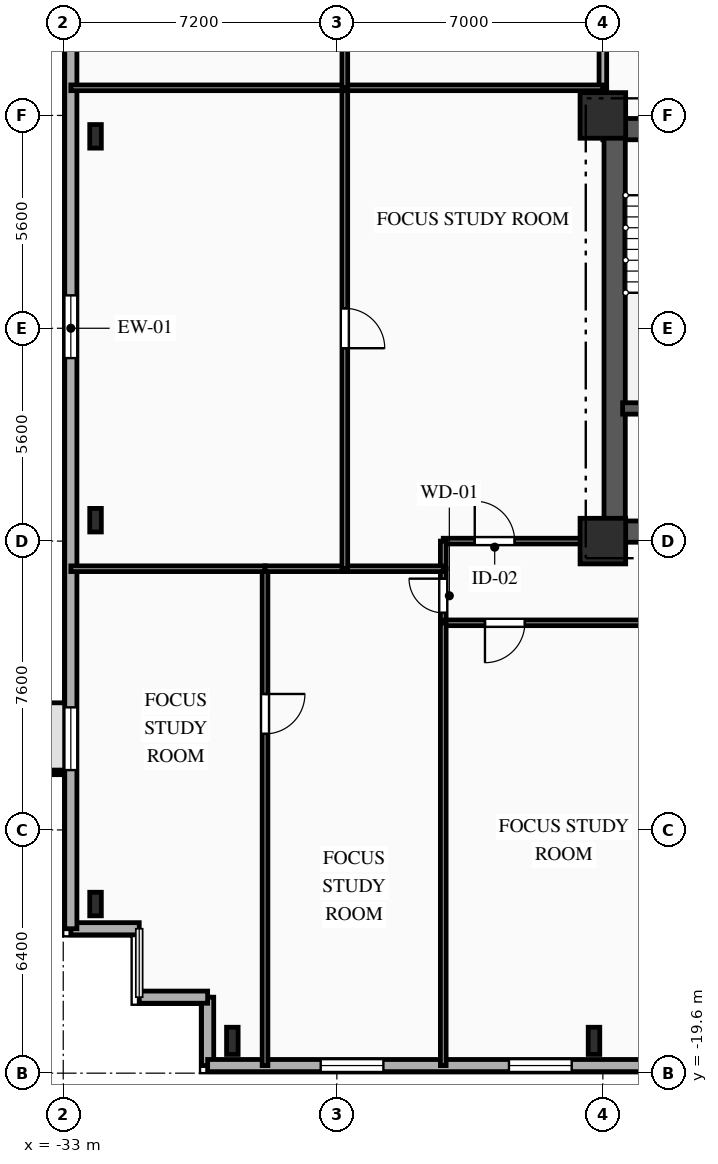
"""IFC4 building model, lengths in metres.
Left out: names, types, materials, properties, quantities, classifications, styles, units other than length and angle.
Written with IfcOpenShell. Run it as: python <this file> out.ifc"""

import sys

from ifc_helpers import new_model, si_unit, direction, frame, frame_2d, origin, origin_2d, place, context, subcontext, project, spatial, rectangle, i_section, extrude, element, fill, save


model = new_model("IFC4")
c1 = context("Model", 3, precision=1e-05, world=origin(), true_north=direction((0.0, 1.0)))
c2 = subcontext(c1, "Body", "Model", "MODEL_VIEW")
j1 = project(units=[si_unit("LENGTHUNIT", "METRE"), si_unit("PLANEANGLEUNIT", "RADIAN")], contexts=[c1])
p1 = place(None, origin())
s1 = spatial("IfcSite", under=j1, at=p1, CompositionType="ELEMENT")
p2 = place(p1, origin())
s2 = spatial("IfcBuilding", under=s1, at=p2, CompositionType="ELEMENT")
p3 = place(p2, frame((0.0, 0.0, 70.55)))
s3 = spatial("IfcBuildingStorey", under=s2, at=p3, CompositionType="ELEMENT", Elevation=70.55)
for number, where, z_axis, x_axis in (
    (1, (-18.8, -5.6, 0.0), (0.0, 0.0, 1.0), (1.0, 0.0, 0.0)),
    (2, (-18.8, 5.6, 0.0), (0.0, 0.0, 1.0), (1.0, 0.0, 0.0)),
):
    element("IfcColumn", number, at=place(p3, frame(where, z_axis=z_axis, x_axis=x_axis)), inside=s3, PredefinedType="COLUMN", context=c2, shape_type="SweptSolid", body=[
        extrude(rectangle(XDim=1.2, YDim=1.2, at=origin_2d()), origin(), (0.0, 0.0, 1.0), 3.35),
    ])
for number, where, z_axis, x_axis in (
    (3, (-28.55, -18.75, 0.0), (0.0, 0.0, 1.0), (1.0, 0.0, 0.0)),
    (4, (-19.033, -18.75, 0.0), (0.0, 0.0, 1.0), (1.0, 0.0, 0.0)),
):
    element("IfcColumn", number, at=place(p3, frame(where, z_axis=z_axis, x_axis=x_axis)), inside=s3, PredefinedType="COLUMN", context=c2, shape_type="SweptSolid", body=[
        extrude(i_section(OverallWidth=0.304, OverallDepth=0.716, WebThickness=0.021, FlangeThickness=0.04, FilletRadius=0.027, at=origin_2d()), origin(), (0.0, 0.0, 1.0), 3.35),
    ])
for number, where, z_axis, x_axis in (
    (5, (-32.15, 5.05, 0.0), (0.0, 0.0, 1.0), (1.0, 0.0, 0.0)),
    (6, (-32.15, -5.05, 0.0), (0.0, 0.0, 1.0), (1.0, 0.0, 0.0)),
    (7, (-32.15, -15.15, 0.0), (0.0, 0.0, 1.0), (1.0, 0.0, 0.0)),
):
    element("IfcColumn", number, at=place(p3, frame(where, z_axis=z_axis, x_axis=x_axis)), inside=s3, PredefinedType="COLUMN", context=c2, shape_type="SweptSolid", body=[
        extrude(i_section(OverallWidth=0.305, OverallDepth=0.62, WebThickness=0.021, FlangeThickness=0.04, FilletRadius=0.027, at=origin_2d()), origin(), (0.0, 0.0, 1.0), 3.35),
    ])
p4 = place(p3, frame((-29.2, -19.4, 0.0), z_axis=(0.0, 0.0, 1.0), x_axis=(0.0, 1.0, 0.0)))
e8 = element("IfcWall", 8, at=p4, inside=s3, PredefinedType="SOLIDWALL", context=c2, shape_type="SweptSolid", body=[
    extrude(rectangle(XDim=1.8, YDim=0.32, at=frame_2d((0.9, 0.0))), origin(), (0.0, 0.0, 1.0), 3.0),
])
for number, where, z_axis, x_axis in (
    (9, (-29.2, -17.6, 0.0), (0.0, 0.0, 1.0), (-1.0, 0.0, 0.0)),
    (10, (-31.0, -15.8, 0.0), (0.0, 0.0, 1.0), (-1.0, 0.0, 0.0)),
):
    element("IfcWall", number, at=place(p3, frame(where, z_axis=z_axis, x_axis=x_axis)), inside=s3, PredefinedType="SOLIDWALL", context=c2, shape_type="SweptSolid", body=[
        extrude(rectangle(XDim=1.8, YDim=0.32, at=frame_2d((0.9, 0.0))), origin(), (0.0, 0.0, 1.0), 3.0),
    ])
p5 = place(p3, frame((-32.8, -15.8, 0.0), z_axis=(0.0, 0.0, 1.0), x_axis=(0.0, 1.0, 0.0)))
e11 = element("IfcWall", 11, at=p5, inside=s3, PredefinedType="SOLIDWALL", context=c2, shape_type="SweptSolid", body=[
    extrude(rectangle(XDim=31.6, YDim=0.32, at=frame_2d((15.8, 0.0))), origin(), (0.0, 0.0, 1.0), 3.0),
])
p6 = place(p5, frame((4.175, 0.0, 0.85)))
e12 = element("IfcOpeningElement", 12, at=p6, cuts=e11, PredefinedType="OPENING", context=c2, shape_type="SweptSolid", body=[
    extrude(rectangle(XDim=1.65, YDim=1.85, at=frame_2d((0.825, 0.925))), frame((0.0, 0.17, 0.0), z_axis=(0.0, -1.0, 0.0), x_axis=(1.0, 0.0, 0.0)), (0.0, 0.0, 1.0), 0.34),
])
p7 = place(p5, frame((15.015, 0.0, 0.85)))
e13 = element("IfcOpeningElement", 13, at=p7, cuts=e11, PredefinedType="OPENING", context=c2, shape_type="SweptSolid", body=[
    extrude(rectangle(XDim=1.65, YDim=1.85, at=frame_2d((0.825, 0.925))), frame((0.0, 0.17, 0.0), z_axis=(0.0, -1.0, 0.0), x_axis=(1.0, 0.0, 0.0)), (0.0, 0.0, 1.0), 0.34),
])
p8 = place(p5, frame((25.855, 0.0, 0.85)))
e14 = element("IfcOpeningElement", 14, at=p8, cuts=e11, PredefinedType="OPENING", context=c2, shape_type="SweptSolid", body=[
    extrude(rectangle(XDim=1.65, YDim=1.85, at=frame_2d((0.825, 0.925))), frame((0.0, 0.17, 0.0), z_axis=(0.0, -1.0, 0.0), x_axis=(1.0, 0.0, 0.0)), (0.0, 0.0, 1.0), 0.34),
])
p9 = place(p3, frame((29.2, -19.4, 0.0), z_axis=(0.0, 0.0, 1.0), x_axis=(-1.0, 0.0, 0.0)))
e15 = element("IfcWall", 15, at=p9, inside=s3, PredefinedType="SOLIDWALL", context=c2, shape_type="SweptSolid", body=[
    extrude(rectangle(XDim=58.4, YDim=0.32, at=frame_2d((29.2, 0.0))), origin(), (0.0, 0.0, 1.0), 3.0),
])
p10 = place(p9, frame((2.535, 0.0, 0.85)))
e16 = element("IfcOpeningElement", 16, at=p10, cuts=e15, PredefinedType="OPENING", context=c2, shape_type="SweptSolid", body=[
    extrude(rectangle(XDim=1.65, YDim=1.85, at=frame_2d((0.825, 0.925))), frame((0.0, 0.17, 0.0), z_axis=(0.0, -1.0, 0.0), x_axis=(1.0, 0.0, 0.0)), (0.0, 0.0, 1.0), 0.34),
])
p11 = place(p9, frame((7.975, 0.0, 0.85)))
e17 = element("IfcOpeningElement", 17, at=p11, cuts=e15, PredefinedType="OPENING", context=c2, shape_type="SweptSolid", body=[
    extrude(rectangle(XDim=1.65, YDim=1.85, at=frame_2d((0.825, 0.925))), frame((0.0, 0.17, 0.0), z_axis=(0.0, -1.0, 0.0), x_axis=(1.0, 0.0, 0.0)), (0.0, 0.0, 1.0), 0.34),
])
p12 = place(p9, frame((13.14, 0.0, 0.85)))
e18 = element("IfcOpeningElement", 18, at=p12, cuts=e15, PredefinedType="OPENING", context=c2, shape_type="SweptSolid", body=[
    extrude(rectangle(XDim=2.2, YDim=1.85, at=frame_2d((1.1, 0.925))), frame((0.0, 0.17, 0.0), z_axis=(0.0, -1.0, 0.0), x_axis=(1.0, 0.0, 0.0)), (0.0, 0.0, 1.0), 0.34),
])
p13 = place(p9, frame((19.992, 0.0, 0.85)))
e19 = element("IfcOpeningElement", 19, at=p13, cuts=e15, PredefinedType="OPENING", context=c2, shape_type="SweptSolid", body=[
    extrude(rectangle(XDim=2.2, YDim=1.85, at=frame_2d((1.1, 0.925))), frame((0.0, 0.17, 0.0), z_axis=(0.0, -1.0, 0.0), x_axis=(1.0, 0.0, 0.0)), (0.0, 0.0, 1.0), 0.34),
])
p14 = place(p9, frame((24.66, 0.0, 0.85)))
e20 = element("IfcOpeningElement", 20, at=p14, cuts=e15, PredefinedType="OPENING", context=c2, shape_type="SweptSolid", body=[
    extrude(rectangle(XDim=2.2, YDim=1.85, at=frame_2d((1.1, 0.925))), frame((0.0, 0.17, 0.0), z_axis=(0.0, -1.0, 0.0), x_axis=(1.0, 0.0, 0.0)), (0.0, 0.0, 1.0), 0.34),
])
p15 = place(p9, frame((30.42, 0.0, 0.85)))
e21 = element("IfcOpeningElement", 21, at=p15, cuts=e15, PredefinedType="OPENING", context=c2, shape_type="SweptSolid", body=[
    extrude(rectangle(XDim=2.2, YDim=1.85, at=frame_2d((1.1, 0.925))), frame((0.0, 0.17, 0.0), z_axis=(0.0, -1.0, 0.0), x_axis=(1.0, 0.0, 0.0)), (0.0, 0.0, 1.0), 0.34),
])
p16 = place(p9, frame((36.18, 0.0, 0.85)))
e22 = element("IfcOpeningElement", 22, at=p16, cuts=e15, PredefinedType="OPENING", context=c2, shape_type="SweptSolid", body=[
    extrude(rectangle(XDim=2.2, YDim=1.85, at=frame_2d((1.1, 0.925))), frame((0.0, 0.17, 0.0), z_axis=(0.0, -1.0, 0.0), x_axis=(1.0, 0.0, 0.0)), (0.0, 0.0, 1.0), 0.34),
])
p17 = place(p9, frame((41.94, 0.0, 0.85)))
e23 = element("IfcOpeningElement", 23, at=p17, cuts=e15, PredefinedType="OPENING", context=c2, shape_type="SweptSolid", body=[
    extrude(rectangle(XDim=2.2, YDim=1.85, at=frame_2d((1.1, 0.925))), frame((0.0, 0.17, 0.0), z_axis=(0.0, -1.0, 0.0), x_axis=(1.0, 0.0, 0.0)), (0.0, 0.0, 1.0), 0.34),
])
p18 = place(p9, frame((48.821, 0.0, 0.85)))
e24 = element("IfcOpeningElement", 24, at=p18, cuts=e15, PredefinedType="OPENING", context=c2, shape_type="SweptSolid", body=[
    extrude(rectangle(XDim=1.65, YDim=1.85, at=frame_2d((0.825, 0.925))), frame((0.0, 0.17, 0.0), z_axis=(0.0, -1.0, 0.0), x_axis=(1.0, 0.0, 0.0)), (0.0, 0.0, 1.0), 0.34),
])
p19 = place(p9, frame((53.775, 0.0, 0.85)))
e25 = element("IfcOpeningElement", 25, at=p19, cuts=e15, PredefinedType="OPENING", context=c2, shape_type="SweptSolid", body=[
    extrude(rectangle(XDim=1.65, YDim=1.85, at=frame_2d((0.825, 0.925))), frame((0.0, 0.17, 0.0), z_axis=(0.0, -1.0, 0.0), x_axis=(1.0, 0.0, 0.0)), (0.0, 0.0, 1.0), 0.34),
])
p20 = place(p3, frame((-18.8, 5.24, 0.0), z_axis=(0.0, 0.0, 1.0), x_axis=(1.0, 0.0, 0.0)))
e26 = element("IfcWall", 26, at=p20, inside=s3, PredefinedType="SHEAR", context=c2, shape_type="SweptSolid", body=[
    extrude(rectangle(XDim=9.6, YDim=0.56, at=frame_2d((4.8, 0.0))), origin(), (0.0, 0.0, 1.0), 3.0),
])
p21 = place(p20, frame((1.55, 0.0, 0.0)))
e27 = element("IfcOpeningElement", 27, at=p21, cuts=e26, PredefinedType="OPENING", context=c2, shape_type="SweptSolid", body=[
    extrude(rectangle(XDim=1.1, YDim=2.15, at=frame_2d((0.55, 1.075))), frame((0.0, 0.29, 0.0), z_axis=(0.0, -1.0, 0.0), x_axis=(1.0, 0.0, 0.0)), (0.0, 0.0, 1.0), 0.58),
])
p22 = place(p20, frame((4.775, 0.0, 0.0)))
e28 = element("IfcOpeningElement", 28, at=p22, cuts=e26, PredefinedType="OPENING", context=c2, shape_type="SweptSolid", body=[
    extrude(rectangle(XDim=1.05, YDim=2.1, at=frame_2d((0.525, 1.05))), frame((0.0, 0.29, 0.0), z_axis=(0.0, -1.0, 0.0), x_axis=(1.0, 0.0, 0.0)), (0.0, 0.0, 1.0), 0.58),
])
p23 = place(p3, frame((-18.8, -5.35, 0.0), z_axis=(0.0, 0.0, 1.0), x_axis=(1.0, 0.0, 0.0)))
e29 = element("IfcWall", 29, at=p23, inside=s3, PredefinedType="SHEAR", context=c2, shape_type="SweptSolid", body=[
    extrude(rectangle(XDim=9.6, YDim=0.56, at=frame_2d((4.8, 0.0))), origin(), (0.0, 0.0, 1.0), 3.0),
])
p24 = place(p23, frame((1.05, 0.0, 0.0)))
e30 = element("IfcOpeningElement", 30, at=p24, cuts=e29, PredefinedType="OPENING", context=c2, shape_type="SweptSolid", body=[
    extrude(rectangle(XDim=0.9, YDim=2.1, at=frame_2d((0.45, 1.05))), frame((0.0, 0.29, 0.0), z_axis=(0.0, -1.0, 0.0), x_axis=(1.0, 0.0, 0.0)), (0.0, 0.0, 1.0), 0.58),
])
p25 = place(p3, frame((-18.49, -5.05, 0.0), z_axis=(0.0, 0.0, 1.0), x_axis=(0.0, 1.0, 0.0)))
e31 = element("IfcWall", 31, at=p25, inside=s3, PredefinedType="SHEAR", context=c2, shape_type="SweptSolid", body=[
    extrude(rectangle(XDim=10.1, YDim=0.56, at=frame_2d((5.05, 0.0))), origin(), (0.0, 0.0, 1.0), 3.0),
])
p26 = place(p3, frame((-18.28, -2.11, 0.0), z_axis=(0.0, 0.0, 1.0), x_axis=(1.0, 0.0, 0.0)))
e32 = element("IfcWall", 32, at=p26, inside=s3, PredefinedType="SHEAR", context=c2, shape_type="SweptSolid", body=[
    extrude(rectangle(XDim=3.18, YDim=0.3, at=frame_2d((1.59, 0.0))), origin(), (0.0, 0.0, 1.0), 3.0),
])
p27 = place(p3, frame((-18.8, 6.327, 0.0), z_axis=(0.0, 0.0, 1.0), x_axis=(0.0, -1.0, 0.0)))
e33 = element("IfcWall", 33, at=p27, inside=s3, PredefinedType="PARTITIONING", context=c2, shape_type="SweptSolid", body=[
    extrude(rectangle(XDim=0.727, YDim=0.2, at=frame_2d((0.363, 0.0))), origin(), (0.0, 0.0, 1.0), 2.485),
])
p28 = place(p3, frame((-18.8, 8.5, 0.0), z_axis=(0.0, 0.0, 1.0), x_axis=(0.0, -1.0, 0.0)))
e34 = element("IfcWall", 34, at=p28, inside=s3, PredefinedType="PARTITIONING", context=c2, shape_type="SweptSolid", body=[
    extrude(rectangle(XDim=2.173, YDim=0.2, at=frame_2d((1.086, 0.0))), origin(), (0.0, 0.0, 1.0), 2.485),
])
p29 = place(p3, frame((-23.0, -7.75, 0.0), z_axis=(0.0, 0.0, 1.0), x_axis=(0.0, 1.0, 0.0)))
e35 = element("IfcWall", 35, at=p29, inside=s3, PredefinedType="PARTITIONING", context=c2, shape_type="SweptSolid", body=[
    extrude(rectangle(XDim=1.423, YDim=0.15, at=frame_2d((0.711, 0.0))), origin(), (0.0, 0.0, 1.0), 3.0),
])
p30 = place(p29, frame((0.261, 0.0, 0.0)))
e36 = element("IfcOpeningElement", 36, at=p30, cuts=e35, PredefinedType="OPENING", context=c2, shape_type="SweptSolid", body=[
    extrude(rectangle(XDim=0.9, YDim=2.1, at=frame_2d((0.45, 1.05))), frame((0.0, 0.085, 0.0), z_axis=(0.0, -1.0, 0.0), x_axis=(1.0, 0.0, 0.0)), (0.0, 0.0, 1.0), 0.17),
])
p31 = place(p3, frame((-23.0, -5.6, 0.0), z_axis=(0.0, 0.0, 1.0), x_axis=(1.0, 0.0, 0.0)))
e37 = element("IfcWall", 37, at=p31, inside=s3, PredefinedType="PARTITIONING", context=c2, shape_type="SweptSolid", body=[
    extrude(rectangle(XDim=4.2, YDim=0.15, at=frame_2d((2.1, 0.0))), origin(), (0.0, 0.0, 1.0), 3.0),
])
p32 = place(p31, frame((0.829, 0.0, 0.0)))
e38 = element("IfcOpeningElement", 38, at=p32, cuts=e37, PredefinedType="OPENING", context=c2, shape_type="SweptSolid", body=[
    extrude(rectangle(XDim=1.05, YDim=2.15, at=frame_2d((0.525, 1.075))), frame((0.0, 0.085, 0.0), z_axis=(0.0, -1.0, 0.0), x_axis=(1.0, 0.0, 0.0)), (0.0, 0.0, 1.0), 0.17),
])
p33 = place(p3, frame((-23.0, -6.327, 0.0), z_axis=(0.0, 0.0, 1.0), x_axis=(0.0, 1.0, 0.0)))
e39 = element("IfcWall", 39, at=p33, inside=s3, PredefinedType="PARTITIONING", context=c2, shape_type="SweptSolid", body=[
    extrude(rectangle(XDim=0.727, YDim=0.15, at=frame_2d((0.363, 0.0))), origin(), (0.0, 0.0, 1.0), 3.0),
])
p34 = place(p3, frame((-16.65, -7.75, 0.0), z_axis=(0.0, 0.0, 1.0), x_axis=(-1.0, 0.0, 0.0)))
e40 = element("IfcWall", 40, at=p34, inside=s3, PredefinedType="PARTITIONING", context=c2, shape_type="SweptSolid", body=[
    extrude(rectangle(XDim=6.35, YDim=0.15, at=frame_2d((3.175, 0.0))), origin(), (0.0, 0.0, 1.0), 3.0),
])
p35 = place(p34, frame((4.202, 0.0, 0.0)))
e41 = element("IfcOpeningElement", 41, at=p35, cuts=e40, PredefinedType="OPENING", context=c2, shape_type="SweptSolid", body=[
    extrude(rectangle(XDim=1.05, YDim=2.15, at=frame_2d((0.525, 1.075))), frame((0.0, 0.085, 0.0), z_axis=(0.0, -1.0, 0.0), x_axis=(1.0, 0.0, 0.0)), (0.0, 0.0, 1.0), 0.17),
])
p36 = place(p3, frame((-27.69, -6.327, 0.0), z_axis=(0.0, 0.0, 1.0), x_axis=(0.0, -1.0, 0.0)))
e42 = element("IfcWall", 42, at=p36, inside=s3, PredefinedType="PARTITIONING", context=c2, shape_type="SweptSolid", body=[
    extrude(rectangle(XDim=13.073, YDim=0.15, at=frame_2d((6.537, 0.0))), origin(), (0.0, 0.0, 1.0), 3.0),
])
p37 = place(p36, frame((3.296, 0.0, 0.0)))
e43 = element("IfcOpeningElement", 43, at=p37, cuts=e42, PredefinedType="OPENING", context=c2, shape_type="SweptSolid", body=[
    extrude(rectangle(XDim=1.05, YDim=2.15, at=frame_2d((0.525, 1.075))), frame((0.0, 0.085, 0.0), z_axis=(0.0, -1.0, 0.0), x_axis=(1.0, 0.0, 0.0)), (0.0, 0.0, 1.0), 0.17),
])
p38 = place(p3, frame((-32.8, -6.327, 0.0), z_axis=(0.0, 0.0, 1.0), x_axis=(1.0, 0.0, 0.0)))
e44 = element("IfcWall", 44, at=p38, inside=s3, PredefinedType="PARTITIONING", context=c2, shape_type="SweptSolid", body=[
    extrude(rectangle(XDim=5.11, YDim=0.15, at=frame_2d((2.555, 0.0))), origin(), (0.0, 0.0, 1.0), 3.0),
])
p39 = place(p3, frame((-27.69, -6.327, 0.0), z_axis=(0.0, 0.0, 1.0), x_axis=(1.0, 0.0, 0.0)))
e45 = element("IfcWall", 45, at=p39, inside=s3, PredefinedType="PARTITIONING", context=c2, shape_type="SweptSolid", body=[
    extrude(rectangle(XDim=2.1, YDim=0.15, at=frame_2d((1.05, 0.0))), origin(), (0.0, 0.0, 1.0), 3.0),
])
p40 = place(p3, frame((-25.59, -6.327, 0.0), z_axis=(0.0, 0.0, 1.0), x_axis=(1.0, 0.0, 0.0)))
e46 = element("IfcWall", 46, at=p40, inside=s3, PredefinedType="PARTITIONING", context=c2, shape_type="SweptSolid", body=[
    extrude(rectangle(XDim=2.59, YDim=0.15, at=frame_2d((1.295, 0.0))), origin(), (0.0, 0.0, 1.0), 3.0),
])
p41 = place(p3, frame((-23.0, -7.75, 0.0), z_axis=(0.0, 0.0, 1.0), x_axis=(0.0, -1.0, 0.0)))
e47 = element("IfcWall", 47, at=p41, inside=s3, PredefinedType="PARTITIONING", context=c2, shape_type="SweptSolid", body=[
    extrude(rectangle(XDim=11.65, YDim=0.15, at=frame_2d((5.825, 0.0))), origin(), (0.0, 0.0, 1.0), 3.0),
])
p42 = place(p3, frame((-25.59, 6.327, 0.0), z_axis=(0.0, 0.0, 1.0), x_axis=(0.0, -1.0, 0.0)))
e48 = element("IfcWall", 48, at=p42, inside=s3, PredefinedType="PARTITIONING", context=c2, shape_type="SweptSolid", body=[
    extrude(rectangle(XDim=12.654, YDim=0.15, at=frame_2d((6.327, 0.0))), origin(), (0.0, 0.0, 1.0), 2.655),
])
p43 = place(p42, frame((5.802, 0.0, 0.0)))
e49 = element("IfcOpeningElement", 49, at=p43, cuts=e48, PredefinedType="OPENING", context=c2, shape_type="SweptSolid", body=[
    extrude(rectangle(XDim=1.05, YDim=2.15, at=frame_2d((0.525, 1.075))), frame((0.0, 0.085, 0.0), z_axis=(0.0, -1.0, 0.0), x_axis=(1.0, 0.0, 0.0)), (0.0, 0.0, 1.0), 0.17),
])
p44 = place(p3, frame((-32.8, 6.327, 0.0), z_axis=(0.0, 0.0, 1.0), x_axis=(1.0, 0.0, 0.0)))
e50 = element("IfcWall", 50, at=p44, inside=s3, PredefinedType="PARTITIONING", context=c2, shape_type="SweptSolid", body=[
    extrude(rectangle(XDim=7.21, YDim=0.15, at=frame_2d((3.605, 0.0))), origin(), (0.0, 0.0, 1.0), 3.0),
])
p45 = place(p3, frame((-25.59, 6.327, 0.0), z_axis=(0.0, 0.0, 1.0), x_axis=(1.0, 0.0, 0.0)))
e51 = element("IfcWall", 51, at=p45, inside=s3, PredefinedType="PARTITIONING", context=c2, shape_type="SweptSolid", body=[
    extrude(rectangle(XDim=6.79, YDim=0.15, at=frame_2d((3.395, 0.0))), origin(), (0.0, 0.0, 1.0), 3.0),
])
p46 = place(p3, frame((-25.59, 19.4, 0.0), z_axis=(0.0, 0.0, 1.0), x_axis=(0.0, -1.0, 0.0)))
e52 = element("IfcWall", 52, at=p46, inside=s3, PredefinedType="PARTITIONING", context=c2, shape_type="SweptSolid", body=[
    extrude(rectangle(XDim=13.073, YDim=0.15, at=frame_2d((6.537, 0.0))), origin(), (0.0, 0.0, 1.0), 2.655),
])
p47 = place(p46, frame((8.727, 0.0, 0.0)))
e53 = element("IfcOpeningElement", 53, at=p47, cuts=e52, PredefinedType="OPENING", context=c2, shape_type="SweptSolid", body=[
    extrude(rectangle(XDim=1.05, YDim=2.15, at=frame_2d((0.525, 1.075))), frame((0.0, 0.085, 0.0), z_axis=(0.0, -1.0, 0.0), x_axis=(1.0, 0.0, 0.0)), (0.0, 0.0, 1.0), 0.17),
])
p48 = place(p6, origin())
e54 = element("IfcWindow", 54, at=p48, inside=s3, PartitioningType="SINGLE_PANEL", PredefinedType="WINDOW", context=c2, shape_type="SweptSolid", body=[
    extrude(rectangle(XDim=1.65, YDim=1.85, at=frame_2d((0.825, 0.925))), frame((0.0, 0.03, 0.0), z_axis=(0.0, -1.0, 0.0), x_axis=(1.0, 0.0, 0.0)), (0.0, 0.0, 1.0), 0.06),
])
fill(e12, e54)
p49 = place(p7, origin())
e55 = element("IfcWindow", 55, at=p49, inside=s3, PartitioningType="SINGLE_PANEL", PredefinedType="WINDOW", context=c2, shape_type="SweptSolid", body=[
    extrude(rectangle(XDim=1.65, YDim=1.85, at=frame_2d((0.825, 0.925))), frame((0.0, 0.03, 0.0), z_axis=(0.0, -1.0, 0.0), x_axis=(1.0, 0.0, 0.0)), (0.0, 0.0, 1.0), 0.06),
])
fill(e13, e55)
p50 = place(p18, origin())
e56 = element("IfcWindow", 56, at=p50, inside=s3, PartitioningType="SINGLE_PANEL", PredefinedType="WINDOW", context=c2, shape_type="SweptSolid", body=[
    extrude(rectangle(XDim=1.65, YDim=1.85, at=frame_2d((0.825, 0.925))), frame((0.0, 0.03, 0.0), z_axis=(0.0, -1.0, 0.0), x_axis=(1.0, 0.0, 0.0)), (0.0, 0.0, 1.0), 0.06),
])
fill(e24, e56)
p51 = place(p19, origin())
e57 = element("IfcWindow", 57, at=p51, inside=s3, PartitioningType="SINGLE_PANEL", PredefinedType="WINDOW", context=c2, shape_type="SweptSolid", body=[
    extrude(rectangle(XDim=1.65, YDim=1.85, at=frame_2d((0.825, 0.925))), frame((0.0, 0.03, 0.0), z_axis=(0.0, -1.0, 0.0), x_axis=(1.0, 0.0, 0.0)), (0.0, 0.0, 1.0), 0.06),
])
fill(e25, e57)
p52 = place(p30, origin())
e58 = element("IfcDoor", 58, at=p52, inside=s3, OperationType="SINGLE_SWING_RIGHT", PredefinedType="DOOR", context=c2, shape_type="SweptSolid", body=[
    extrude(rectangle(XDim=0.9, YDim=2.1, at=frame_2d((0.45, 1.05))), frame((0.0, 0.025, 0.0), z_axis=(0.0, -1.0, 0.0), x_axis=(1.0, 0.0, 0.0)), (0.0, 0.0, 1.0), 0.05),
])
fill(e36, e58)
p53 = place(p32, origin())
e59 = element("IfcDoor", 59, at=p53, inside=s3, OperationType="SINGLE_SWING_LEFT", PredefinedType="DOOR", context=c2, shape_type="SweptSolid", body=[
    extrude(rectangle(XDim=1.05, YDim=2.15, at=frame_2d((0.525, 1.075))), frame((0.0, 0.025, 0.0), z_axis=(0.0, -1.0, 0.0), x_axis=(1.0, 0.0, 0.0)), (0.0, 0.0, 1.0), 0.05),
])
fill(e38, e59)
p54 = place(p35, origin())
e60 = element("IfcDoor", 60, at=p54, inside=s3, OperationType="SINGLE_SWING_RIGHT", PredefinedType="DOOR", context=c2, shape_type="SweptSolid", body=[
    extrude(rectangle(XDim=1.05, YDim=2.15, at=frame_2d((0.525, 1.075))), frame((0.0, 0.025, 0.0), z_axis=(0.0, -1.0, 0.0), x_axis=(1.0, 0.0, 0.0)), (0.0, 0.0, 1.0), 0.05),
])
fill(e41, e60)
p55 = place(p37, origin())
e61 = element("IfcDoor", 61, at=p55, inside=s3, OperationType="SINGLE_SWING_LEFT", PredefinedType="DOOR", context=c2, shape_type="SweptSolid", body=[
    extrude(rectangle(XDim=1.05, YDim=2.15, at=frame_2d((0.525, 1.075))), frame((0.0, 0.025, 0.0), z_axis=(0.0, -1.0, 0.0), x_axis=(1.0, 0.0, 0.0)), (0.0, 0.0, 1.0), 0.05),
])
fill(e43, e61)
p56 = place(p43, origin())
e62 = element("IfcDoor", 62, at=p56, inside=s3, OperationType="SINGLE_SWING_RIGHT", PredefinedType="DOOR", context=c2, shape_type="SweptSolid", body=[
    extrude(rectangle(XDim=1.05, YDim=2.15, at=frame_2d((0.525, 1.075))), frame((0.0, 0.025, 0.0), z_axis=(0.0, -1.0, 0.0), x_axis=(1.0, 0.0, 0.0)), (0.0, 0.0, 1.0), 0.05),
])
fill(e49, e62)
save(model, sys.argv[1])
